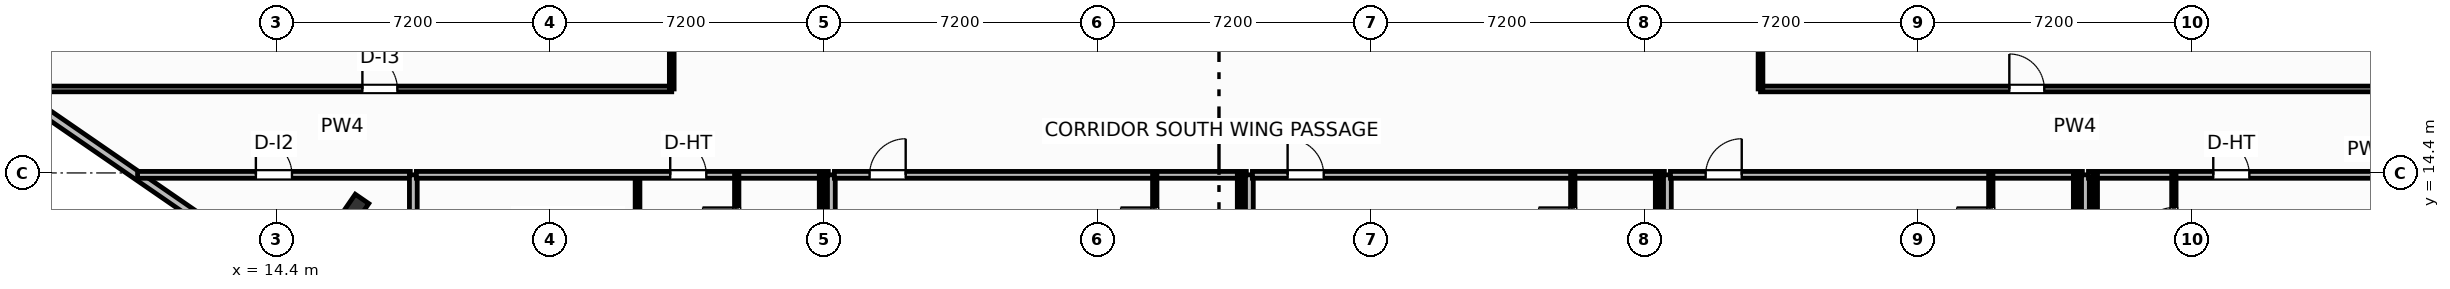
"""IFC4 building model, lengths in metres.
Left out: names, types, materials, properties, quantities, classifications, styles, units other than length and angle.
Written with IfcOpenShell. Run it as: python <this file> out.ifc"""

import sys

from ifc_helpers import new_model, si_unit, direction, frame, frame_2d, origin, origin_2d, place, context, subcontext, project, spatial, rectangle, i_section, extrude, element, fill, save


model = new_model("IFC4")
c1 = context("Model", 3, precision=1e-05, world=origin(), true_north=direction((0.0, 1.0)))
c2 = subcontext(c1, "Body", "Model", "MODEL_VIEW")
j1 = project(units=[si_unit("LENGTHUNIT", "METRE"), si_unit("PLANEANGLEUNIT", "RADIAN")], contexts=[c1])
p1 = place(None, origin())
s1 = spatial("IfcSite", under=j1, at=p1, CompositionType="ELEMENT")
p2 = place(p1, origin())
s2 = spatial("IfcBuilding", under=s1, at=p2, CompositionType="ELEMENT")
p3 = place(p2, frame((0.0, 0.0, 45.5)))
s3 = spatial("IfcBuildingStorey", under=s2, at=p3, CompositionType="ELEMENT", Elevation=45.5)
p4 = place(p3, frame((16.509, 13.512, 0.0), z_axis=(0.0, 0.0, 1.0), x_axis=(0.823532597628, -0.567268949127, 0.0)))
e1 = element("IfcColumn", 1, at=p4, inside=s3, PredefinedType="COLUMN", context=c2, shape_type="SweptSolid", body=[
    extrude(i_section(OverallWidth=0.432, OverallDepth=0.498, WebThickness=0.056, FlangeThickness=0.089, FilletRadius=0.025, at=origin_2d()), origin(), (0.0, 0.0, 1.0), 3.7),
])
p5 = place(p3, frame((-2.728, 23.605, 0.0), z_axis=(0.0, 0.0, 1.0), x_axis=(0.823535075462, -0.567265351915, 0.0)))
e2 = element("IfcWall", 2, at=p5, inside=s3, PredefinedType="SOLIDWALL", context=c2, shape_type="SweptSolid", body=[
    extrude(rectangle(XDim=23.247, YDim=0.22, at=frame_2d((11.624, 0.0))), origin(), (0.0, 0.0, 1.0), 2.73),
])
p6 = place(p5, frame((3.887, 0.0, 0.8)))
e3 = element("IfcOpeningElement", 3, at=p6, cuts=e2, PredefinedType="OPENING", context=c2, shape_type="SweptSolid", body=[
    extrude(rectangle(XDim=1.65, YDim=1.65, at=frame_2d((0.825, 0.825))), frame((0.0, 0.12, 0.0), z_axis=(0.0, -1.0, 0.0), x_axis=(1.0, 0.0, 0.0)), (0.0, 0.0, 1.0), 0.24),
])
p7 = place(p3, frame((7.463, 16.61, 0.0), z_axis=(0.0, 0.0, 1.0), x_axis=(1.0, 0.0, 0.0)))
e4 = element("IfcWall", 4, at=p7, inside=s3, PredefinedType="PARTITIONING", context=c2, shape_type="SweptSolid", body=[
    extrude(rectangle(XDim=17.337, YDim=0.15, at=frame_2d((8.668, 0.0))), origin(), (0.0, 0.0, 1.0), 3.45),
])
p8 = place(p7, frame((9.197, 0.0, 0.0)))
e5 = element("IfcOpeningElement", 5, at=p8, cuts=e4, PredefinedType="OPENING", context=c2, shape_type="SweptSolid", body=[
    extrude(rectangle(XDim=0.92, YDim=2.05, at=frame_2d((0.46, 1.025))), frame((0.0, 0.085, 0.0), z_axis=(0.0, -1.0, 0.0), x_axis=(1.0, 0.0, 0.0)), (0.0, 0.0, 1.0), 0.17),
])
p9 = place(p3, frame((24.8, 16.61, 0.0), z_axis=(0.0, 0.0, 1.0), x_axis=(0.0, 1.0, 0.0)))
e6 = element("IfcWall", 6, at=p9, inside=s3, PredefinedType="PARTITIONING", context=c2, shape_type="SweptSolid", body=[
    extrude(rectangle(XDim=2.63, YDim=0.125, at=frame_2d((1.315, 0.0))), origin(), (0.0, 0.0, 1.0), 2.58),
])
p10 = place(p3, frame((53.45, 16.61, 0.0), z_axis=(0.0, 0.0, 1.0), x_axis=(1.0, 0.0, 0.0)))
e7 = element("IfcWall", 7, at=p10, inside=s3, PredefinedType="PARTITIONING", context=c2, shape_type="SweptSolid", body=[
    extrude(rectangle(XDim=16.55, YDim=0.15, at=frame_2d((8.275, 0.0))), origin(), (0.0, 0.0, 1.0), 2.58),
])
p11 = place(p10, frame((6.548, 0.0, 0.0)))
e8 = element("IfcOpeningElement", 8, at=p11, cuts=e7, PredefinedType="OPENING", context=c2, shape_type="SweptSolid", body=[
    extrude(rectangle(XDim=0.92, YDim=2.05, at=frame_2d((0.46, 1.025))), frame((0.0, 0.085, 0.0), z_axis=(0.0, -1.0, 0.0), x_axis=(1.0, 0.0, 0.0)), (0.0, 0.0, 1.0), 0.17),
])
p12 = place(p3, frame((53.45, 16.61, 0.0), z_axis=(0.0, 0.0, 1.0), x_axis=(0.0, 1.0, 0.0)))
e9 = element("IfcWall", 9, at=p12, inside=s3, PredefinedType="PARTITIONING", context=c2, shape_type="SweptSolid", body=[
    extrude(rectangle(XDim=2.63, YDim=0.125, at=frame_2d((1.315, 0.0))), origin(), (0.0, 0.0, 1.0), 3.45),
])
p13 = place(p3, frame((10.744, 14.35, 0.0), z_axis=(0.0, 0.0, 1.0), x_axis=(1.0, 0.0, 0.0)))
e10 = element("IfcWall", 10, at=p13, inside=s3, PredefinedType="PARTITIONING", context=c2, shape_type="SweptSolid", body=[
    extrude(rectangle(XDim=7.176, YDim=0.18, at=frame_2d((3.588, 0.0))), origin(), (0.0, 0.0, 1.0), 3.45),
])
p14 = place(p13, frame((3.113, 0.0, 0.0)))
e11 = element("IfcOpeningElement", 11, at=p14, cuts=e10, PredefinedType="OPENING", context=c2, shape_type="SweptSolid", body=[
    extrude(rectangle(XDim=0.95, YDim=2.05, at=frame_2d((0.475, 1.025))), frame((0.0, 0.1, 0.0), z_axis=(0.0, -1.0, 0.0), x_axis=(1.0, 0.0, 0.0)), (0.0, 0.0, 1.0), 0.2),
])
p15 = place(p3, frame((18.0, 11.902, 0.0), z_axis=(0.0, 0.0, 1.0), x_axis=(0.0, 1.0, 0.0)))
e12 = element("IfcWall", 12, at=p15, inside=s3, PredefinedType="PARTITIONING", context=c2, shape_type="SweptSolid", body=[
    extrude(rectangle(XDim=2.448, YDim=0.205, at=frame_2d((1.224, 0.0))), origin(), (0.0, 0.0, 1.0), 3.45),
])
p16 = place(p3, frame((23.9, 5.288, 0.0), z_axis=(0.0, 0.0, 1.0), x_axis=(0.0, 1.0, 0.0)))
e13 = element("IfcWall", 13, at=p16, inside=s3, PredefinedType="PARTITIONING", context=c2, shape_type="SweptSolid", body=[
    extrude(rectangle(XDim=9.062, YDim=0.125, at=frame_2d((4.531, 0.0))), origin(), (0.0, 0.0, 1.0), 3.45),
])
p17 = place(p16, frame((4.425, 0.0, 0.0)))
e14 = element("IfcOpeningElement", 14, at=p17, cuts=e13, PredefinedType="OPENING", context=c2, shape_type="SweptSolid", body=[
    extrude(rectangle(XDim=0.92, YDim=2.05, at=frame_2d((0.46, 1.025))), frame((0.0, 0.073, 0.0), z_axis=(0.0, -1.0, 0.0), x_axis=(1.0, 0.0, 0.0)), (0.0, 0.0, 1.0), 0.145),
])
p18 = place(p3, frame((18.08, 14.35, 0.0), z_axis=(0.0, 0.0, 1.0), x_axis=(1.0, 0.0, 0.0)))
e15 = element("IfcWall", 15, at=p18, inside=s3, PredefinedType="PARTITIONING", context=c2, shape_type="SweptSolid", body=[
    extrude(rectangle(XDim=10.84, YDim=0.18, at=frame_2d((5.42, 0.0))), origin(), (0.0, 0.0, 1.0), 3.45),
])
p19 = place(p18, frame((6.68, 0.0, 0.0)))
e16 = element("IfcOpeningElement", 16, at=p19, cuts=e15, PredefinedType="OPENING", context=c2, shape_type="SweptSolid", body=[
    extrude(rectangle(XDim=0.95, YDim=2.15, at=frame_2d((0.475, 1.075))), frame((0.0, 0.1, 0.0), z_axis=(0.0, -1.0, 0.0), x_axis=(1.0, 0.0, 0.0)), (0.0, 0.0, 1.0), 0.2),
])
p20 = place(p3, frame((26.51, 11.83, 0.0), z_axis=(0.0, 0.0, 1.0), x_axis=(0.0, 1.0, 0.0)))
e17 = element("IfcWall", 17, at=p20, inside=s3, PredefinedType="PARTITIONING", context=c2, shape_type="SweptSolid", body=[
    extrude(rectangle(XDim=2.52, YDim=0.115, at=frame_2d((1.26, 0.0))), origin(), (0.0, 0.0, 1.0), 3.45),
])
p21 = place(p20, frame((0.76, 0.0, 0.0)))
e18 = element("IfcOpeningElement", 18, at=p21, cuts=e17, PredefinedType="OPENING", context=c2, shape_type="SweptSolid", body=[
    extrude(rectangle(XDim=0.9, YDim=2.05, at=frame_2d((0.45, 1.025))), frame((0.0, 0.067, 0.0), z_axis=(0.0, -1.0, 0.0), x_axis=(1.0, 0.0, 0.0)), (0.0, 0.0, 1.0), 0.135),
])
p22 = place(p3, frame((28.74, 11.83, 0.0), z_axis=(0.0, 0.0, 1.0), x_axis=(0.0, 1.0, 0.0)))
e19 = element("IfcWall", 19, at=p22, inside=s3, PredefinedType="PARTITIONING", context=c2, shape_type="SweptSolid", body=[
    extrude(rectangle(XDim=2.52, YDim=0.115, at=frame_2d((1.26, 0.0))), origin(), (0.0, 0.0, 1.0), 3.45),
])
p23 = place(p3, frame((29.0, 3.335, 0.0), z_axis=(0.0, 0.0, 1.0), x_axis=(0.0, 1.0, 0.0)))
e20 = element("IfcWall", 20, at=p23, inside=s3, PredefinedType="PARTITIONING", context=c2, shape_type="SweptSolid", body=[
    extrude(rectangle(XDim=11.015, YDim=0.205, at=frame_2d((5.507, 0.0))), origin(), (0.0, 0.0, 1.0), 3.45),
])
p24 = place(p3, frame((29.08, 14.35, 0.0), z_axis=(0.0, 0.0, 1.0), x_axis=(1.0, 0.0, 0.0)))
e21 = element("IfcWall", 21, at=p24, inside=s3, PredefinedType="PARTITIONING", context=c2, shape_type="SweptSolid", body=[
    extrude(rectangle(XDim=10.84, YDim=0.18, at=frame_2d((5.42, 0.0))), origin(), (0.0, 0.0, 1.0), 3.45),
])
p25 = place(p24, frame((0.926, 0.0, 0.0)))
e22 = element("IfcOpeningElement", 22, at=p25, cuts=e21, PredefinedType="OPENING", context=c2, shape_type="SweptSolid", body=[
    extrude(rectangle(XDim=0.95, YDim=2.15, at=frame_2d((0.475, 1.075))), frame((0.0, 0.1, 0.0), z_axis=(0.0, -1.0, 0.0), x_axis=(1.0, 0.0, 0.0)), (0.0, 0.0, 1.0), 0.2),
])
p26 = place(p3, frame((37.51, 11.83, 0.0), z_axis=(0.0, 0.0, 1.0), x_axis=(0.0, 1.0, 0.0)))
e23 = element("IfcWall", 23, at=p26, inside=s3, PredefinedType="PARTITIONING", context=c2, shape_type="SweptSolid", body=[
    extrude(rectangle(XDim=2.52, YDim=0.115, at=frame_2d((1.26, 0.0))), origin(), (0.0, 0.0, 1.0), 3.45),
])
p27 = place(p26, frame((0.76, 0.0, 0.0)))
e24 = element("IfcOpeningElement", 24, at=p27, cuts=e23, PredefinedType="OPENING", context=c2, shape_type="SweptSolid", body=[
    extrude(rectangle(XDim=0.9, YDim=2.05, at=frame_2d((0.45, 1.025))), frame((0.0, 0.067, 0.0), z_axis=(0.0, -1.0, 0.0), x_axis=(1.0, 0.0, 0.0)), (0.0, 0.0, 1.0), 0.135),
])
p28 = place(p3, frame((39.74, 11.83, 0.0), z_axis=(0.0, 0.0, 1.0), x_axis=(0.0, 1.0, 0.0)))
e25 = element("IfcWall", 25, at=p28, inside=s3, PredefinedType="PARTITIONING", context=c2, shape_type="SweptSolid", body=[
    extrude(rectangle(XDim=2.52, YDim=0.115, at=frame_2d((1.26, 0.0))), origin(), (0.0, 0.0, 1.0), 3.45),
])
p29 = place(p3, frame((40.0, -4.0, 0.0), z_axis=(0.0, 0.0, 1.0), x_axis=(0.0, 1.0, 0.0)))
e26 = element("IfcWall", 26, at=p29, inside=s3, PredefinedType="PARTITIONING", context=c2, shape_type="SweptSolid", body=[
    extrude(rectangle(XDim=18.35, YDim=0.205, at=frame_2d((9.175, 0.0))), origin(), (0.0, 0.0, 1.0), 2.58),
])
p30 = place(p3, frame((40.08, 14.35, 0.0), z_axis=(0.0, 0.0, 1.0), x_axis=(1.0, 0.0, 0.0)))
e27 = element("IfcWall", 27, at=p30, inside=s3, PredefinedType="PARTITIONING", context=c2, shape_type="SweptSolid", body=[
    extrude(rectangle(XDim=10.84, YDim=0.18, at=frame_2d((5.42, 0.0))), origin(), (0.0, 0.0, 1.0), 3.45),
])
p31 = place(p30, frame((0.926, 0.0, 0.0)))
e28 = element("IfcOpeningElement", 28, at=p31, cuts=e27, PredefinedType="OPENING", context=c2, shape_type="SweptSolid", body=[
    extrude(rectangle(XDim=0.95, YDim=2.15, at=frame_2d((0.475, 1.075))), frame((0.0, 0.1, 0.0), z_axis=(0.0, -1.0, 0.0), x_axis=(1.0, 0.0, 0.0)), (0.0, 0.0, 1.0), 0.2),
])
p32 = place(p3, frame((48.51, 11.83, 0.0), z_axis=(0.0, 0.0, 1.0), x_axis=(0.0, 1.0, 0.0)))
e29 = element("IfcWall", 29, at=p32, inside=s3, PredefinedType="PARTITIONING", context=c2, shape_type="SweptSolid", body=[
    extrude(rectangle(XDim=2.52, YDim=0.115, at=frame_2d((1.26, 0.0))), origin(), (0.0, 0.0, 1.0), 3.45),
])
p33 = place(p32, frame((0.76, 0.0, 0.0)))
e30 = element("IfcOpeningElement", 30, at=p33, cuts=e29, PredefinedType="OPENING", context=c2, shape_type="SweptSolid", body=[
    extrude(rectangle(XDim=0.9, YDim=2.05, at=frame_2d((0.45, 1.025))), frame((0.0, 0.067, 0.0), z_axis=(0.0, -1.0, 0.0), x_axis=(1.0, 0.0, 0.0)), (0.0, 0.0, 1.0), 0.135),
])
p34 = place(p3, frame((50.74, 11.83, 0.0), z_axis=(0.0, 0.0, 1.0), x_axis=(0.0, 1.0, 0.0)))
e31 = element("IfcWall", 31, at=p34, inside=s3, PredefinedType="PARTITIONING", context=c2, shape_type="SweptSolid", body=[
    extrude(rectangle(XDim=2.52, YDim=0.115, at=frame_2d((1.26, 0.0))), origin(), (0.0, 0.0, 1.0), 3.45),
])
p35 = place(p3, frame((51.0, -4.0, 0.0), z_axis=(0.0, 0.0, 1.0), x_axis=(0.0, 1.0, 0.0)))
e32 = element("IfcWall", 32, at=p35, inside=s3, PredefinedType="PARTITIONING", context=c2, shape_type="SweptSolid", body=[
    extrude(rectangle(XDim=18.35, YDim=0.205, at=frame_2d((9.175, 0.0))), origin(), (0.0, 0.0, 1.0), 3.45),
])
p36 = place(p3, frame((51.08, 14.35, 0.0), z_axis=(0.0, 0.0, 1.0), x_axis=(1.0, 0.0, 0.0)))
e33 = element("IfcWall", 33, at=p36, inside=s3, PredefinedType="PARTITIONING", context=c2, shape_type="SweptSolid", body=[
    extrude(rectangle(XDim=10.84, YDim=0.18, at=frame_2d((5.42, 0.0))), origin(), (0.0, 0.0, 1.0), 3.45),
])
p37 = place(p36, frame((0.926, 0.0, 0.0)))
e34 = element("IfcOpeningElement", 34, at=p37, cuts=e33, PredefinedType="OPENING", context=c2, shape_type="SweptSolid", body=[
    extrude(rectangle(XDim=0.95, YDim=2.15, at=frame_2d((0.475, 1.075))), frame((0.0, 0.1, 0.0), z_axis=(0.0, -1.0, 0.0), x_axis=(1.0, 0.0, 0.0)), (0.0, 0.0, 1.0), 0.2),
])
p38 = place(p3, frame((59.51, 11.83, 0.0), z_axis=(0.0, 0.0, 1.0), x_axis=(0.0, 1.0, 0.0)))
e35 = element("IfcWall", 35, at=p38, inside=s3, PredefinedType="PARTITIONING", context=c2, shape_type="SweptSolid", body=[
    extrude(rectangle(XDim=2.52, YDim=0.115, at=frame_2d((1.26, 0.0))), origin(), (0.0, 0.0, 1.0), 3.45),
])
p39 = place(p38, frame((0.76, 0.0, 0.0)))
e36 = element("IfcOpeningElement", 36, at=p39, cuts=e35, PredefinedType="OPENING", context=c2, shape_type="SweptSolid", body=[
    extrude(rectangle(XDim=0.9, YDim=2.05, at=frame_2d((0.45, 1.025))), frame((0.0, 0.067, 0.0), z_axis=(0.0, -1.0, 0.0), x_axis=(1.0, 0.0, 0.0)), (0.0, 0.0, 1.0), 0.135),
])
p40 = place(p3, frame((61.74, 11.83, 0.0), z_axis=(0.0, 0.0, 1.0), x_axis=(0.0, 1.0, 0.0)))
e37 = element("IfcWall", 37, at=p40, inside=s3, PredefinedType="PARTITIONING", context=c2, shape_type="SweptSolid", body=[
    extrude(rectangle(XDim=2.52, YDim=0.115, at=frame_2d((1.26, 0.0))), origin(), (0.0, 0.0, 1.0), 3.45),
])
p41 = place(p3, frame((62.0, -4.0, 0.0), z_axis=(0.0, 0.0, 1.0), x_axis=(0.0, 1.0, 0.0)))
e38 = element("IfcWall", 38, at=p41, inside=s3, PredefinedType="PARTITIONING", context=c2, shape_type="SweptSolid", body=[
    extrude(rectangle(XDim=18.35, YDim=0.205, at=frame_2d((9.175, 0.0))), origin(), (0.0, 0.0, 1.0), 3.45),
])
p42 = place(p3, frame((62.08, 14.35, 0.0), z_axis=(0.0, 0.0, 1.0), x_axis=(1.0, 0.0, 0.0)))
e39 = element("IfcWall", 39, at=p42, inside=s3, PredefinedType="PARTITIONING", context=c2, shape_type="SweptSolid", body=[
    extrude(rectangle(XDim=14.74, YDim=0.18, at=frame_2d((7.37, 0.0))), origin(), (0.0, 0.0, 1.0), 2.58),
])
p43 = place(p42, frame((3.284, 0.0, 0.0)))
e40 = element("IfcOpeningElement", 40, at=p43, cuts=e39, PredefinedType="OPENING", context=c2, shape_type="SweptSolid", body=[
    extrude(rectangle(XDim=0.95, YDim=2.15, at=frame_2d((0.475, 1.075))), frame((0.0, 0.1, 0.0), z_axis=(0.0, -1.0, 0.0), x_axis=(1.0, 0.0, 0.0)), (0.0, 0.0, 1.0), 0.2),
])
p44 = place(p3, frame((64.327, 11.83, 0.0), z_axis=(0.0, 0.0, 1.0), x_axis=(0.0, 1.0, 0.0)))
e41 = element("IfcWall", 41, at=p44, inside=s3, PredefinedType="PARTITIONING", context=c2, shape_type="SweptSolid", body=[
    extrude(rectangle(XDim=2.52, YDim=0.115, at=frame_2d((1.26, 0.0))), origin(), (0.0, 0.0, 1.0), 3.45),
])
p45 = place(p44, frame((0.76, 0.0, 0.0)))
e42 = element("IfcOpeningElement", 42, at=p45, cuts=e41, PredefinedType="OPENING", context=c2, shape_type="SweptSolid", body=[
    extrude(rectangle(XDim=0.9, YDim=2.05, at=frame_2d((0.45, 1.025))), frame((0.0, 0.067, 0.0), z_axis=(0.0, -1.0, 0.0), x_axis=(1.0, 0.0, 0.0)), (0.0, 0.0, 1.0), 0.135),
])
p46 = place(p3, frame((62.26, 11.83, 0.0), z_axis=(0.0, 0.0, 1.0), x_axis=(0.0, 1.0, 0.0)))
e43 = element("IfcWall", 43, at=p46, inside=s3, PredefinedType="PARTITIONING", context=c2, shape_type="SweptSolid", body=[
    extrude(rectangle(XDim=2.52, YDim=0.115, at=frame_2d((1.26, 0.0))), origin(), (0.0, 0.0, 1.0), 3.45),
])
p47 = place(p8, origin())
e44 = element("IfcDoor", 44, at=p47, inside=s3, OperationType="SINGLE_SWING_LEFT", PredefinedType="DOOR", context=c2, shape_type="SweptSolid", body=[
    extrude(rectangle(XDim=0.92, YDim=2.05, at=frame_2d((0.46, 1.025))), frame((0.0, 0.025, 0.0), z_axis=(0.0, -1.0, 0.0), x_axis=(1.0, 0.0, 0.0)), (0.0, 0.0, 1.0), 0.05),
])
fill(e5, e44)
p48 = place(p11, origin())
e45 = element("IfcDoor", 45, at=p48, inside=s3, OperationType="SINGLE_SWING_LEFT", PredefinedType="DOOR", context=c2, shape_type="SweptSolid", body=[
    extrude(rectangle(XDim=0.92, YDim=2.05, at=frame_2d((0.46, 1.025))), frame((0.0, 0.025, 0.0), z_axis=(0.0, -1.0, 0.0), x_axis=(1.0, 0.0, 0.0)), (0.0, 0.0, 1.0), 0.05),
])
fill(e8, e45)
p49 = place(p14, origin())
e46 = element("IfcDoor", 46, at=p49, inside=s3, OperationType="SINGLE_SWING_LEFT", PredefinedType="DOOR", context=c2, shape_type="SweptSolid", body=[
    extrude(rectangle(XDim=0.95, YDim=2.05, at=frame_2d((0.475, 1.025))), frame((0.0, 0.025, 0.0), z_axis=(0.0, -1.0, 0.0), x_axis=(1.0, 0.0, 0.0)), (0.0, 0.0, 1.0), 0.05),
])
fill(e11, e46)
p50 = place(p19, origin())
e47 = element("IfcDoor", 47, at=p50, inside=s3, OperationType="SINGLE_SWING_LEFT", PredefinedType="DOOR", context=c2, shape_type="SweptSolid", body=[
    extrude(rectangle(XDim=0.95, YDim=2.15, at=frame_2d((0.475, 1.075))), frame((0.0, 0.025, 0.0), z_axis=(0.0, -1.0, 0.0), x_axis=(1.0, 0.0, 0.0)), (0.0, 0.0, 1.0), 0.05),
])
fill(e16, e47)
p51 = place(p21, origin())
e48 = element("IfcDoor", 48, at=p51, inside=s3, OperationType="SINGLE_SWING_RIGHT", PredefinedType="DOOR", context=c2, shape_type="SweptSolid", body=[
    extrude(rectangle(XDim=0.9, YDim=2.05, at=frame_2d((0.45, 1.025))), frame((0.0, 0.025, 0.0), z_axis=(0.0, -1.0, 0.0), x_axis=(1.0, 0.0, 0.0)), (0.0, 0.0, 1.0), 0.05),
])
fill(e18, e48)
p52 = place(p25, origin())
e49 = element("IfcDoor", 49, at=p52, inside=s3, OperationType="SINGLE_SWING_RIGHT", PredefinedType="DOOR", context=c2, shape_type="SweptSolid", body=[
    extrude(rectangle(XDim=0.95, YDim=2.15, at=frame_2d((0.475, 1.075))), frame((0.0, 0.025, 0.0), z_axis=(0.0, -1.0, 0.0), x_axis=(1.0, 0.0, 0.0)), (0.0, 0.0, 1.0), 0.05),
])
fill(e22, e49)
p53 = place(p27, origin())
e50 = element("IfcDoor", 50, at=p53, inside=s3, OperationType="SINGLE_SWING_RIGHT", PredefinedType="DOOR", context=c2, shape_type="SweptSolid", body=[
    extrude(rectangle(XDim=0.9, YDim=2.05, at=frame_2d((0.45, 1.025))), frame((0.0, 0.025, 0.0), z_axis=(0.0, -1.0, 0.0), x_axis=(1.0, 0.0, 0.0)), (0.0, 0.0, 1.0), 0.05),
])
fill(e24, e50)
p54 = place(p31, origin())
e51 = element("IfcDoor", 51, at=p54, inside=s3, OperationType="SINGLE_SWING_LEFT", PredefinedType="DOOR", context=c2, shape_type="SweptSolid", body=[
    extrude(rectangle(XDim=0.95, YDim=2.15, at=frame_2d((0.475, 1.075))), frame((0.0, 0.025, 0.0), z_axis=(0.0, -1.0, 0.0), x_axis=(1.0, 0.0, 0.0)), (0.0, 0.0, 1.0), 0.05),
])
fill(e28, e51)
p55 = place(p33, origin())
e52 = element("IfcDoor", 52, at=p55, inside=s3, OperationType="SINGLE_SWING_RIGHT", PredefinedType="DOOR", context=c2, shape_type="SweptSolid", body=[
    extrude(rectangle(XDim=0.9, YDim=2.05, at=frame_2d((0.45, 1.025))), frame((0.0, 0.025, 0.0), z_axis=(0.0, -1.0, 0.0), x_axis=(1.0, 0.0, 0.0)), (0.0, 0.0, 1.0), 0.05),
])
fill(e30, e52)
p56 = place(p37, origin())
e53 = element("IfcDoor", 53, at=p56, inside=s3, OperationType="SINGLE_SWING_RIGHT", PredefinedType="DOOR", context=c2, shape_type="SweptSolid", body=[
    extrude(rectangle(XDim=0.95, YDim=2.15, at=frame_2d((0.475, 1.075))), frame((0.0, 0.025, 0.0), z_axis=(0.0, -1.0, 0.0), x_axis=(1.0, 0.0, 0.0)), (0.0, 0.0, 1.0), 0.05),
])
fill(e34, e53)
p57 = place(p39, origin())
e54 = element("IfcDoor", 54, at=p57, inside=s3, OperationType="SINGLE_SWING_RIGHT", PredefinedType="DOOR", context=c2, shape_type="SweptSolid", body=[
    extrude(rectangle(XDim=0.9, YDim=2.05, at=frame_2d((0.45, 1.025))), frame((0.0, 0.025, 0.0), z_axis=(0.0, -1.0, 0.0), x_axis=(1.0, 0.0, 0.0)), (0.0, 0.0, 1.0), 0.05),
])
fill(e36, e54)
p58 = place(p43, origin())
e55 = element("IfcDoor", 55, at=p58, inside=s3, OperationType="SINGLE_SWING_LEFT", PredefinedType="DOOR", context=c2, shape_type="SweptSolid", body=[
    extrude(rectangle(XDim=0.95, YDim=2.15, at=frame_2d((0.475, 1.075))), frame((0.0, 0.025, 0.0), z_axis=(0.0, -1.0, 0.0), x_axis=(1.0, 0.0, 0.0)), (0.0, 0.0, 1.0), 0.05),
])
fill(e40, e55)
p59 = place(p45, origin())
e56 = element("IfcDoor", 56, at=p59, inside=s3, OperationType="SINGLE_SWING_LEFT", PredefinedType="DOOR", context=c2, shape_type="SweptSolid", body=[
    extrude(rectangle(XDim=0.9, YDim=2.05, at=frame_2d((0.45, 1.025))), frame((0.0, 0.025, 0.0), z_axis=(0.0, -1.0, 0.0), x_axis=(1.0, 0.0, 0.0)), (0.0, 0.0, 1.0), 0.05),
])
fill(e42, e56)
save(model, sys.argv[1])
